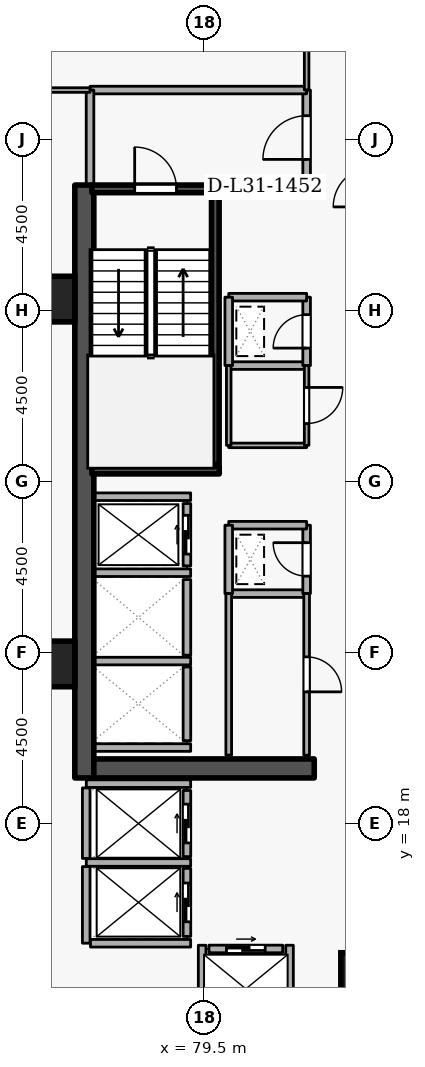
"""IFC4 building model, lengths in metres.
Left out: names, types, materials, properties, quantities, classifications, styles, units other than length and angle.
Written with IfcOpenShell. Run it as: python <this file> out.ifc"""

import sys

from ifc_helpers import new_model, si_unit, direction, frame, frame_2d, origin, origin_2d, place, context, subcontext, project, spatial, rectangle, extrude, element, fill, save


model = new_model("IFC4")
c1 = context("Model", 3, precision=1e-05, world=origin(), true_north=direction((0.0, 1.0)))
c2 = subcontext(c1, "Body", "Model", "MODEL_VIEW")
j1 = project(units=[si_unit("LENGTHUNIT", "METRE"), si_unit("PLANEANGLEUNIT", "RADIAN")], contexts=[c1])
p1 = place(None, origin())
s1 = spatial("IfcSite", under=j1, at=p1, CompositionType="ELEMENT")
p2 = place(p1, origin())
s2 = spatial("IfcBuilding", under=s1, at=p2, CompositionType="ELEMENT")
p3 = place(p2, frame((0.0, 0.0, 119.7)))
s3 = spatial("IfcBuildingStorey", under=s2, at=p3, CompositionType="ELEMENT", Elevation=119.7)
p4 = place(p3, frame((76.35, 19.2, 0.0), z_axis=(0.0, 0.0, 1.0), x_axis=(0.0, 1.0, 0.0)))
e1 = element("IfcWall", 1, at=p4, inside=s3, PredefinedType="SHEAR", context=c2, shape_type="SweptSolid", body=[
    extrude(rectangle(XDim=15.6, YDim=0.5, at=frame_2d((7.8, 0.0))), origin(), (0.0, 0.0, 1.0), 3.6),
])
p5 = place(p3, frame((76.6, 19.45, 0.0), z_axis=(0.0, 0.0, 1.0), x_axis=(1.0, 0.0, 0.0)))
e2 = element("IfcWall", 2, at=p5, inside=s3, PredefinedType="SHEAR", context=c2, shape_type="SweptSolid", body=[
    extrude(rectangle(XDim=5.8, YDim=0.5, at=frame_2d((2.9, 0.0))), origin(), (0.0, 0.0, 1.0), 3.6),
])
for number, where, z_axis, x_axis in (
    (3, (83.7, 14.0, 0.0), (0.0, 0.0, 1.0), (1.0, 0.0, 0.0)),
    (4, (75.5, 22.2, 0.0), (0.0, 0.0, 1.0), (1.0, 0.0, 0.0)),
    (5, (75.5, 31.8, 0.0), (0.0, 0.0, 1.0), (1.0, 0.0, 0.0)),
):
    element("IfcColumn", number, at=place(p3, frame(where, z_axis=z_axis, x_axis=x_axis)), inside=s3, PredefinedType="COLUMN", context=c2, shape_type="SweptSolid", body=[
        extrude(rectangle(XDim=1.2, YDim=1.2, at=origin_2d()), origin(), (0.0, 0.0, 1.0), 3.6),
    ])
p6 = place(p3, frame((79.05, 24.78, 0.0), z_axis=(0.0, 0.0, 1.0), x_axis=(0.0, 1.0, 0.0)))
e6 = element("IfcWall", 6, at=p6, inside=s3, PredefinedType="STANDARD", context=c2, shape_type="SweptSolid", body=[
    extrude(rectangle(XDim=1.64, YDim=0.2, at=frame_2d((0.82, 0.0))), origin(), (0.0, 0.0, 1.0), 3.32),
])
p7 = place(p6, frame((0.31, 0.0, 0.0)))
e7 = element("IfcOpeningElement", 7, at=p7, cuts=e6, PredefinedType="OPENING", context=c2, shape_type="SweptSolid", body=[
    extrude(rectangle(XDim=1.02, YDim=2.06, at=frame_2d((0.51, 1.03))), frame((0.0, 0.11, 0.0), z_axis=(0.0, -1.0, 0.0), x_axis=(1.0, 0.0, 0.0)), (0.0, 0.0, 1.0), 0.22),
])
p8 = place(p3, frame((79.05, 22.43, 0.0), z_axis=(0.0, 0.0, 1.0), x_axis=(0.0, 1.0, 0.0)))
e8 = element("IfcWall", 8, at=p8, inside=s3, PredefinedType="STANDARD", context=c2, shape_type="SweptSolid", body=[
    extrude(rectangle(XDim=1.99, YDim=0.2, at=frame_2d((0.995, 0.0))), origin(), (0.0, 0.0, 1.0), 3.32),
])
p9 = place(p3, frame((79.05, 20.18, 0.0), z_axis=(0.0, 0.0, 1.0), x_axis=(0.0, 1.0, 0.0)))
e9 = element("IfcWall", 9, at=p9, inside=s3, PredefinedType="STANDARD", context=c2, shape_type="SweptSolid", body=[
    extrude(rectangle(XDim=1.94, YDim=0.2, at=frame_2d((0.97, 0.0))), origin(), (0.0, 0.0, 1.0), 3.32),
])
p10 = place(p3, frame((79.05, 17.13, 0.0), z_axis=(0.0, 0.0, 1.0), x_axis=(0.0, 1.0, 0.0)))
e10 = element("IfcWall", 10, at=p10, inside=s3, PredefinedType="STANDARD", context=c2, shape_type="SweptSolid", body=[
    extrude(rectangle(XDim=1.74, YDim=0.2, at=frame_2d((0.87, 0.0))), origin(), (0.0, 0.0, 1.0), 3.32),
])
p11 = place(p10, frame((0.36, 0.0, 0.0)))
e11 = element("IfcOpeningElement", 11, at=p11, cuts=e10, PredefinedType="OPENING", context=c2, shape_type="SweptSolid", body=[
    extrude(rectangle(XDim=1.02, YDim=2.06, at=frame_2d((0.51, 1.03))), frame((0.0, 0.11, 0.0), z_axis=(0.0, -1.0, 0.0), x_axis=(1.0, 0.0, 0.0)), (0.0, 0.0, 1.0), 0.22),
])
p12 = place(p3, frame((79.05, 15.03, 0.0), z_axis=(0.0, 0.0, 1.0), x_axis=(0.0, 1.0, 0.0)))
e12 = element("IfcWall", 12, at=p12, inside=s3, PredefinedType="STANDARD", context=c2, shape_type="SweptSolid", body=[
    extrude(rectangle(XDim=1.79, YDim=0.2, at=frame_2d((0.895, 0.0))), origin(), (0.0, 0.0, 1.0), 3.32),
])
p13 = place(p12, frame((0.385, 0.0, 0.0)))
e13 = element("IfcOpeningElement", 13, at=p13, cuts=e12, PredefinedType="OPENING", context=c2, shape_type="SweptSolid", body=[
    extrude(rectangle(XDim=1.02, YDim=2.06, at=frame_2d((0.51, 1.03))), frame((0.0, 0.11, 0.0), z_axis=(0.0, -1.0, 0.0), x_axis=(1.0, 0.0, 0.0)), (0.0, 0.0, 1.0), 0.22),
])
p14 = place(p3, frame((79.63, 14.7, 0.0), z_axis=(0.0, 0.0, 1.0), x_axis=(1.0, 0.0, 0.0)))
e14 = element("IfcWall", 14, at=p14, inside=s3, PredefinedType="STANDARD", context=c2, shape_type="SweptSolid", body=[
    extrude(rectangle(XDim=1.94, YDim=0.2, at=frame_2d((0.97, 0.0))), origin(), (0.0, 0.0, 1.0), 3.32),
])
p15 = place(p14, frame((0.46, 0.0, 0.0)))
e15 = element("IfcOpeningElement", 15, at=p15, cuts=e14, PredefinedType="OPENING", context=c2, shape_type="SweptSolid", body=[
    extrude(rectangle(XDim=1.02, YDim=2.06, at=frame_2d((0.51, 1.03))), frame((0.0, 0.11, 0.0), z_axis=(0.0, -1.0, 0.0), x_axis=(1.0, 0.0, 0.0)), (0.0, 0.0, 1.0), 0.22),
])
for number, where, z_axis, x_axis in (
    (16, (76.612, 26.6, 0.0), (0.0, 0.0, 1.0), (1.0, 0.0, 0.0)),
    (17, (76.612, 24.6, 0.0), (0.0, 0.0, 1.0), (1.0, 0.0, 0.0)),
    (18, (76.612, 22.275, 0.0), (0.0, 0.0, 1.0), (1.0, 0.0, 0.0)),
    (19, (76.612, 20.0, 0.0), (0.0, 0.0, 1.0), (1.0, 0.0, 0.0)),
):
    element("IfcWall", number, at=place(p3, frame(where, z_axis=z_axis, x_axis=x_axis)), inside=s3, PredefinedType="STANDARD", context=c2, shape_type="SweptSolid", body=[
        extrude(rectangle(XDim=2.536, YDim=0.2, at=frame_2d((1.268, 0.0))), origin(), (0.0, 0.0, 1.0), 3.32),
    ])
p16 = place(p3, frame((76.402, 19.05, 0.0), z_axis=(0.0, 0.0, 1.0), x_axis=(1.0, 0.0, 0.0)))
e20 = element("IfcWall", 20, at=p16, inside=s3, PredefinedType="STANDARD", context=c2, shape_type="SweptSolid", body=[
    extrude(rectangle(XDim=2.746, YDim=0.2, at=frame_2d((1.373, 0.0))), origin(), (0.0, 0.0, 1.0), 2.525),
])
p17 = place(p3, frame((76.402, 16.975, 0.0), z_axis=(0.0, 0.0, 1.0), x_axis=(1.0, 0.0, 0.0)))
e21 = element("IfcWall", 21, at=p17, inside=s3, PredefinedType="STANDARD", context=c2, shape_type="SweptSolid", body=[
    extrude(rectangle(XDim=2.746, YDim=0.2, at=frame_2d((1.373, 0.0))), origin(), (0.0, 0.0, 1.0), 3.32),
])
p18 = place(p3, frame((76.4, 14.852, 0.0), z_axis=(0.0, 0.0, 1.0), x_axis=(0.0, 1.0, 0.0)))
e22 = element("IfcWall", 22, at=p18, inside=s3, PredefinedType="STANDARD", context=c2, shape_type="SweptSolid", body=[
    extrude(rectangle(XDim=2.016, YDim=0.2, at=frame_2d((1.008, 0.0))), origin(), (0.0, 0.0, 1.0), 3.32),
])
p19 = place(p3, frame((76.4, 17.082, 0.0), z_axis=(0.0, 0.0, 1.0), x_axis=(0.0, 1.0, 0.0)))
e23 = element("IfcWall", 23, at=p19, inside=s3, PredefinedType="STANDARD", context=c2, shape_type="SweptSolid", body=[
    extrude(rectangle(XDim=1.856, YDim=0.2, at=frame_2d((0.928, 0.0))), origin(), (0.0, 0.0, 1.0), 3.32),
])
p20 = place(p3, frame((76.512, 14.85, 0.0), z_axis=(0.0, 0.0, 1.0), x_axis=(1.0, 0.0, 0.0)))
e24 = element("IfcWall", 24, at=p20, inside=s3, PredefinedType="STANDARD", context=c2, shape_type="SweptSolid", body=[
    extrude(rectangle(XDim=2.636, YDim=0.2, at=frame_2d((1.318, 0.0))), origin(), (0.0, 0.0, 1.0), 3.32),
])
for number, where, z_axis, x_axis in (
    (25, (81.75, 12.612, 0.0), (0.0, 0.0, 1.0), (0.0, 1.0, 0.0)),
    (26, (79.45, 12.612, 0.0), (0.0, 0.0, 1.0), (0.0, 1.0, 0.0)),
):
    element("IfcWall", number, at=place(p3, frame(where, z_axis=z_axis, x_axis=x_axis)), inside=s3, PredefinedType="STANDARD", context=c2, shape_type="SweptSolid", body=[
        extrude(rectangle(XDim=2.186, YDim=0.2, at=frame_2d((1.093, 0.0))), origin(), (0.0, 0.0, 1.0), 3.32),
    ])
p21 = place(p3, frame((76.55, 34.7, 0.0), z_axis=(0.0, 0.0, 1.0), x_axis=(1.0, 0.0, 0.0)))
e27 = element("IfcWall", 27, at=p21, inside=s3, PredefinedType="SHEAR", context=c2, shape_type="SweptSolid", body=[
    extrude(rectangle(XDim=3.35, YDim=0.2, at=frame_2d((1.675, 0.0))), origin(), (0.0, 0.0, 1.0), 3.6),
])
p22 = place(p21, frame((1.125, 0.0, 0.0)))
e28 = element("IfcOpeningElement", 28, at=p22, cuts=e27, PredefinedType="OPENING", context=c2, shape_type="SweptSolid", body=[
    extrude(rectangle(XDim=1.1, YDim=2.1, at=frame_2d((0.55, 1.05))), frame((0.0, 0.11, 0.0), z_axis=(0.0, -1.0, 0.0), x_axis=(1.0, 0.0, 0.0)), (0.0, 0.0, 1.0), 0.22),
])
p23 = place(p3, frame((79.9, 27.3, 0.0), z_axis=(0.0, 0.0, 1.0), x_axis=(-1.0, 0.0, 0.0)))
e29 = element("IfcWall", 29, at=p23, inside=s3, PredefinedType="SHEAR", context=c2, shape_type="SweptSolid", body=[
    extrude(rectangle(XDim=3.35, YDim=0.2, at=frame_2d((1.675, 0.0))), origin(), (0.0, 0.0, 1.0), 3.6),
])
p24 = place(p3, frame((79.797, 27.45, 0.0), z_axis=(0.0, 0.0, 1.0), x_axis=(0.0, 1.0, 0.0)))
e30 = element("IfcWall", 30, at=p24, inside=s3, PredefinedType="SHEAR", context=c2, shape_type="SweptSolid", body=[
    extrude(rectangle(XDim=7.1, YDim=0.2, at=frame_2d((3.55, 0.0))), origin(), (0.0, 0.0, 1.0), 3.6),
])
p25 = place(p3, frame((79.9, 34.8, 0.0), z_axis=(0.0, 0.0, 1.0), x_axis=(1.0, 0.0, 0.0)))
e31 = element("IfcWall", 31, at=p25, inside=s3, PredefinedType="STANDARD", context=c2, shape_type="SweptSolid", body=[
    extrude(rectangle(XDim=2.3, YDim=0.2, at=frame_2d((1.15, 0.0))), origin(), (0.0, 0.0, 1.0), 2.525),
])
p26 = place(p3, frame((82.2, 34.8, 0.0), z_axis=(0.0, 0.0, 1.0), x_axis=(0.0, 1.0, 0.0)))
e32 = element("IfcWall", 32, at=p26, inside=s3, PredefinedType="STANDARD", context=c2, shape_type="SweptSolid", body=[
    extrude(rectangle(XDim=2.5, YDim=0.2, at=frame_2d((1.25, 0.0))), origin(), (0.0, 0.0, 1.0), 3.32),
])
p27 = place(p26, frame((0.675, 0.0, 0.0)))
e33 = element("IfcOpeningElement", 33, at=p27, cuts=e32, PredefinedType="OPENING", context=c2, shape_type="SweptSolid", body=[
    extrude(rectangle(XDim=1.15, YDim=2.1, at=frame_2d((0.575, 1.05))), frame((0.0, 0.11, 0.0), z_axis=(0.0, -1.0, 0.0), x_axis=(1.0, 0.0, 0.0)), (0.0, 0.0, 1.0), 0.22),
])
p28 = place(p3, frame((82.2, 37.3, 0.0), z_axis=(0.0, 0.0, 1.0), x_axis=(-1.0, 0.0, 0.0)))
e34 = element("IfcWall", 34, at=p28, inside=s3, PredefinedType="STANDARD", context=c2, shape_type="SweptSolid", body=[
    extrude(rectangle(XDim=5.7, YDim=0.2, at=frame_2d((2.85, 0.0))), origin(), (0.0, 0.0, 1.0), 3.32),
])
p29 = place(p3, frame((76.5, 37.3, 0.0), z_axis=(0.0, 0.0, 1.0), x_axis=(0.0, -1.0, 0.0)))
e35 = element("IfcWall", 35, at=p29, inside=s3, PredefinedType="STANDARD", context=c2, shape_type="SweptSolid", body=[
    extrude(rectangle(XDim=2.5, YDim=0.2, at=frame_2d((1.25, 0.0))), origin(), (0.0, 0.0, 1.0), 3.32),
])
p30 = place(p3, frame((80.15, 24.05, 0.0), z_axis=(0.0, 0.0, 1.0), x_axis=(1.0, 0.0, 0.0)))
e36 = element("IfcWall", 36, at=p30, inside=s3, PredefinedType="STANDARD", context=c2, shape_type="SweptSolid", body=[
    extrude(rectangle(XDim=2.05, YDim=0.2, at=frame_2d((1.025, 0.0))), origin(), (0.0, 0.0, 1.0), 3.32),
])
p31 = place(p3, frame((82.2, 24.05, 0.0), z_axis=(0.0, 0.0, 1.0), x_axis=(0.0, 1.0, 0.0)))
e37 = element("IfcWall", 37, at=p31, inside=s3, PredefinedType="STANDARD", context=c2, shape_type="SweptSolid", body=[
    extrude(rectangle(XDim=1.8, YDim=0.2, at=frame_2d((0.9, 0.0))), origin(), (0.0, 0.0, 1.0), 3.32),
])
p32 = place(p31, frame((0.46, 0.0, 0.0)))
e38 = element("IfcOpeningElement", 38, at=p32, cuts=e37, PredefinedType="OPENING", context=c2, shape_type="SweptSolid", body=[
    extrude(rectangle(XDim=0.88, YDim=2.04, at=frame_2d((0.44, 1.02))), frame((0.0, 0.11, 0.0), z_axis=(0.0, -1.0, 0.0), x_axis=(1.0, 0.0, 0.0)), (0.0, 0.0, 1.0), 0.22),
])
p33 = place(p3, frame((82.2, 25.85, 0.0), z_axis=(0.0, 0.0, 1.0), x_axis=(-1.0, 0.0, 0.0)))
e39 = element("IfcWall", 39, at=p33, inside=s3, PredefinedType="STANDARD", context=c2, shape_type="SweptSolid", body=[
    extrude(rectangle(XDim=2.05, YDim=0.2, at=frame_2d((1.025, 0.0))), origin(), (0.0, 0.0, 1.0), 3.32),
])
p34 = place(p3, frame((80.15, 25.85, 0.0), z_axis=(0.0, 0.0, 1.0), x_axis=(0.0, -1.0, 0.0)))
e40 = element("IfcWall", 40, at=p34, inside=s3, PredefinedType="STANDARD", context=c2, shape_type="SweptSolid", body=[
    extrude(rectangle(XDim=1.8, YDim=0.2, at=frame_2d((0.9, 0.0))), origin(), (0.0, 0.0, 1.0), 3.32),
])
p35 = place(p3, frame((80.15, 30.05, 0.0), z_axis=(0.0, 0.0, 1.0), x_axis=(1.0, 0.0, 0.0)))
e41 = element("IfcWall", 41, at=p35, inside=s3, PredefinedType="STANDARD", context=c2, shape_type="SweptSolid", body=[
    extrude(rectangle(XDim=2.05, YDim=0.2, at=frame_2d((1.025, 0.0))), origin(), (0.0, 0.0, 1.0), 3.32),
])
p36 = place(p3, frame((82.2, 30.05, 0.0), z_axis=(0.0, 0.0, 1.0), x_axis=(0.0, 1.0, 0.0)))
e42 = element("IfcWall", 42, at=p36, inside=s3, PredefinedType="STANDARD", context=c2, shape_type="SweptSolid", body=[
    extrude(rectangle(XDim=1.8, YDim=0.2, at=frame_2d((0.9, 0.0))), origin(), (0.0, 0.0, 1.0), 3.32),
])
p37 = place(p36, frame((0.46, 0.0, 0.0)))
e43 = element("IfcOpeningElement", 43, at=p37, cuts=e42, PredefinedType="OPENING", context=c2, shape_type="SweptSolid", body=[
    extrude(rectangle(XDim=0.88, YDim=2.04, at=frame_2d((0.44, 1.02))), frame((0.0, 0.11, 0.0), z_axis=(0.0, -1.0, 0.0), x_axis=(1.0, 0.0, 0.0)), (0.0, 0.0, 1.0), 0.22),
])
p38 = place(p3, frame((82.2, 31.85, 0.0), z_axis=(0.0, 0.0, 1.0), x_axis=(-1.0, 0.0, 0.0)))
e44 = element("IfcWall", 44, at=p38, inside=s3, PredefinedType="STANDARD", context=c2, shape_type="SweptSolid", body=[
    extrude(rectangle(XDim=2.05, YDim=0.2, at=frame_2d((1.025, 0.0))), origin(), (0.0, 0.0, 1.0), 3.32),
])
p39 = place(p3, frame((80.15, 31.85, 0.0), z_axis=(0.0, 0.0, 1.0), x_axis=(0.0, -1.0, 0.0)))
e45 = element("IfcWall", 45, at=p39, inside=s3, PredefinedType="STANDARD", context=c2, shape_type="SweptSolid", body=[
    extrude(rectangle(XDim=1.8, YDim=0.2, at=frame_2d((0.9, 0.0))), origin(), (0.0, 0.0, 1.0), 3.32),
])
p40 = place(p3, frame((80.15, 19.8, 0.0), z_axis=(0.0, 0.0, 1.0), x_axis=(0.0, 1.0, 0.0)))
e46 = element("IfcWall", 46, at=p40, inside=s3, PredefinedType="PARTITIONING", context=c2, shape_type="SweptSolid", body=[
    extrude(rectangle(XDim=4.25, YDim=0.15, at=frame_2d((2.125, 0.0))), origin(), (0.0, 0.0, 1.0), 3.32),
])
p41 = place(p3, frame((82.2, 24.05, 0.0), z_axis=(0.0, 0.0, 1.0), x_axis=(0.0, -1.0, 0.0)))
e47 = element("IfcWall", 47, at=p41, inside=s3, PredefinedType="PARTITIONING", context=c2, shape_type="SweptSolid", body=[
    extrude(rectangle(XDim=4.25, YDim=0.15, at=frame_2d((2.125, 0.0))), origin(), (0.0, 0.0, 1.0), 3.32),
])
p42 = place(p41, frame((1.665, 0.0, 0.0)))
e48 = element("IfcOpeningElement", 48, at=p42, cuts=e47, PredefinedType="OPENING", context=c2, shape_type="SweptSolid", body=[
    extrude(rectangle(XDim=0.92, YDim=2.08, at=frame_2d((0.46, 1.04))), frame((0.0, 0.085, 0.0), z_axis=(0.0, -1.0, 0.0), x_axis=(1.0, 0.0, 0.0)), (0.0, 0.0, 1.0), 0.17),
])
p43 = place(p3, frame((82.2, 27.95, 0.0), z_axis=(0.0, 0.0, 1.0), x_axis=(-1.0, 0.0, 0.0)))
e49 = element("IfcWall", 49, at=p43, inside=s3, PredefinedType="PARTITIONING", context=c2, shape_type="SweptSolid", body=[
    extrude(rectangle(XDim=2.05, YDim=0.12, at=frame_2d((1.025, 0.0))), origin(), (0.0, 0.0, 1.0), 3.32),
])
p44 = place(p3, frame((80.15, 27.95, 0.0), z_axis=(0.0, 0.0, 1.0), x_axis=(0.0, 1.0, 0.0)))
e50 = element("IfcWall", 50, at=p44, inside=s3, PredefinedType="PARTITIONING", context=c2, shape_type="SweptSolid", body=[
    extrude(rectangle(XDim=2.1, YDim=0.12, at=frame_2d((1.05, 0.0))), origin(), (0.0, 0.0, 1.0), 3.32),
])
p45 = place(p3, frame((82.2, 30.05, 0.0), z_axis=(0.0, 0.0, 1.0), x_axis=(0.0, -1.0, 0.0)))
e51 = element("IfcWall", 51, at=p45, inside=s3, PredefinedType="PARTITIONING", context=c2, shape_type="SweptSolid", body=[
    extrude(rectangle(XDim=2.1, YDim=0.12, at=frame_2d((1.05, 0.0))), origin(), (0.0, 0.0, 1.0), 3.32),
])
p46 = place(p45, frame((0.575, 0.0, 0.0)))
e52 = element("IfcOpeningElement", 52, at=p46, cuts=e51, PredefinedType="OPENING", context=c2, shape_type="SweptSolid", body=[
    extrude(rectangle(XDim=0.95, YDim=2.1, at=frame_2d((0.475, 1.05))), frame((0.0, 0.07, 0.0), z_axis=(0.0, -1.0, 0.0), x_axis=(1.0, 0.0, 0.0)), (0.0, 0.0, 1.0), 0.14),
])
p47 = place(p3, frame((82.2, 39.25, 0.0), z_axis=(0.0, 0.0, 1.0), x_axis=(0.0, -1.0, 0.0)))
e53 = element("IfcWall", 53, at=p47, inside=s3, PredefinedType="PARTITIONING", context=c2, shape_type="SweptSolid", body=[
    extrude(rectangle(XDim=1.95, YDim=0.12, at=frame_2d((0.975, 0.0))), origin(), (0.0, 0.0, 1.0), 3.32),
])
p48 = place(p3, frame((76.5, 37.3, 0.0), z_axis=(0.0, 0.0, 1.0), x_axis=(-1.0, 0.0, 0.0)))
e54 = element("IfcWall", 54, at=p48, inside=s3, PredefinedType="PARTITIONING", context=c2, shape_type="SweptSolid", body=[
    extrude(rectangle(XDim=5.72, YDim=0.12, at=frame_2d((2.86, 0.0))), origin(), (0.0, 0.0, 1.0), 3.32),
])
p49 = place(p7, origin())
e55 = element("IfcDoor", 55, at=p49, inside=s3, OperationType="SLIDING_TO_LEFT", PredefinedType="DOOR", context=c2, shape_type="SweptSolid", body=[
    extrude(rectangle(XDim=1.02, YDim=2.06, at=frame_2d((0.51, 1.03))), frame((0.0, 0.025, 0.0), z_axis=(0.0, -1.0, 0.0), x_axis=(1.0, 0.0, 0.0)), (0.0, 0.0, 1.0), 0.05),
])
fill(e7, e55)
p50 = place(p11, origin())
e56 = element("IfcDoor", 56, at=p50, inside=s3, OperationType="SLIDING_TO_LEFT", PredefinedType="DOOR", context=c2, shape_type="SweptSolid", body=[
    extrude(rectangle(XDim=1.02, YDim=2.06, at=frame_2d((0.51, 1.03))), frame((0.0, 0.025, 0.0), z_axis=(0.0, -1.0, 0.0), x_axis=(1.0, 0.0, 0.0)), (0.0, 0.0, 1.0), 0.05),
])
fill(e11, e56)
p51 = place(p13, origin())
e57 = element("IfcDoor", 57, at=p51, inside=s3, OperationType="SLIDING_TO_LEFT", PredefinedType="DOOR", context=c2, shape_type="SweptSolid", body=[
    extrude(rectangle(XDim=1.02, YDim=2.06, at=frame_2d((0.51, 1.03))), frame((0.0, 0.025, 0.0), z_axis=(0.0, -1.0, 0.0), x_axis=(1.0, 0.0, 0.0)), (0.0, 0.0, 1.0), 0.05),
])
fill(e13, e57)
p52 = place(p15, origin())
e58 = element("IfcDoor", 58, at=p52, inside=s3, OperationType="SLIDING_TO_LEFT", PredefinedType="DOOR", context=c2, shape_type="SweptSolid", body=[
    extrude(rectangle(XDim=1.02, YDim=2.06, at=frame_2d((0.51, 1.03))), frame((0.0, 0.025, 0.0), z_axis=(0.0, -1.0, 0.0), x_axis=(1.0, 0.0, 0.0)), (0.0, 0.0, 1.0), 0.05),
])
fill(e15, e58)
p53 = place(p22, origin())
e59 = element("IfcDoor", 59, at=p53, inside=s3, OperationType="SINGLE_SWING_LEFT", PredefinedType="DOOR", context=c2, shape_type="SweptSolid", body=[
    extrude(rectangle(XDim=1.1, YDim=2.1, at=frame_2d((0.55, 1.05))), frame((0.0, 0.025, 0.0), z_axis=(0.0, -1.0, 0.0), x_axis=(1.0, 0.0, 0.0)), (0.0, 0.0, 1.0), 0.05),
])
fill(e28, e59)
p54 = place(p27, origin())
e60 = element("IfcDoor", 60, at=p54, inside=s3, OperationType="SINGLE_SWING_LEFT", PredefinedType="DOOR", context=c2, shape_type="SweptSolid", body=[
    extrude(rectangle(XDim=1.15, YDim=2.1, at=frame_2d((0.575, 1.05))), frame((0.0, 0.025, 0.0), z_axis=(0.0, -1.0, 0.0), x_axis=(1.0, 0.0, 0.0)), (0.0, 0.0, 1.0), 0.05),
])
fill(e33, e60)
p55 = place(p32, origin())
e61 = element("IfcDoor", 61, at=p55, inside=s3, OperationType="SINGLE_SWING_RIGHT", PredefinedType="DOOR", context=c2, shape_type="SweptSolid", body=[
    extrude(rectangle(XDim=0.88, YDim=2.04, at=frame_2d((0.44, 1.02))), frame((0.0, 0.025, 0.0), z_axis=(0.0, -1.0, 0.0), x_axis=(1.0, 0.0, 0.0)), (0.0, 0.0, 1.0), 0.05),
])
fill(e38, e61)
p56 = place(p37, origin())
e62 = element("IfcDoor", 62, at=p56, inside=s3, OperationType="SINGLE_SWING_LEFT", PredefinedType="DOOR", context=c2, shape_type="SweptSolid", body=[
    extrude(rectangle(XDim=0.88, YDim=2.04, at=frame_2d((0.44, 1.02))), frame((0.0, 0.025, 0.0), z_axis=(0.0, -1.0, 0.0), x_axis=(1.0, 0.0, 0.0)), (0.0, 0.0, 1.0), 0.05),
])
fill(e43, e62)
p57 = place(p42, origin())
e63 = element("IfcDoor", 63, at=p57, inside=s3, OperationType="SINGLE_SWING_RIGHT", PredefinedType="DOOR", context=c2, shape_type="SweptSolid", body=[
    extrude(rectangle(XDim=0.92, YDim=2.08, at=frame_2d((0.46, 1.04))), frame((0.0, 0.025, 0.0), z_axis=(0.0, -1.0, 0.0), x_axis=(1.0, 0.0, 0.0)), (0.0, 0.0, 1.0), 0.05),
])
fill(e48, e63)
p58 = place(p46, origin())
e64 = element("IfcDoor", 64, at=p58, inside=s3, OperationType="SINGLE_SWING_LEFT", PredefinedType="DOOR", context=c2, shape_type="SweptSolid", body=[
    extrude(rectangle(XDim=0.95, YDim=2.1, at=frame_2d((0.475, 1.05))), frame((0.0, 0.025, 0.0), z_axis=(0.0, -1.0, 0.0), x_axis=(1.0, 0.0, 0.0)), (0.0, 0.0, 1.0), 0.05),
])
fill(e52, e64)
save(model, sys.argv[1])
